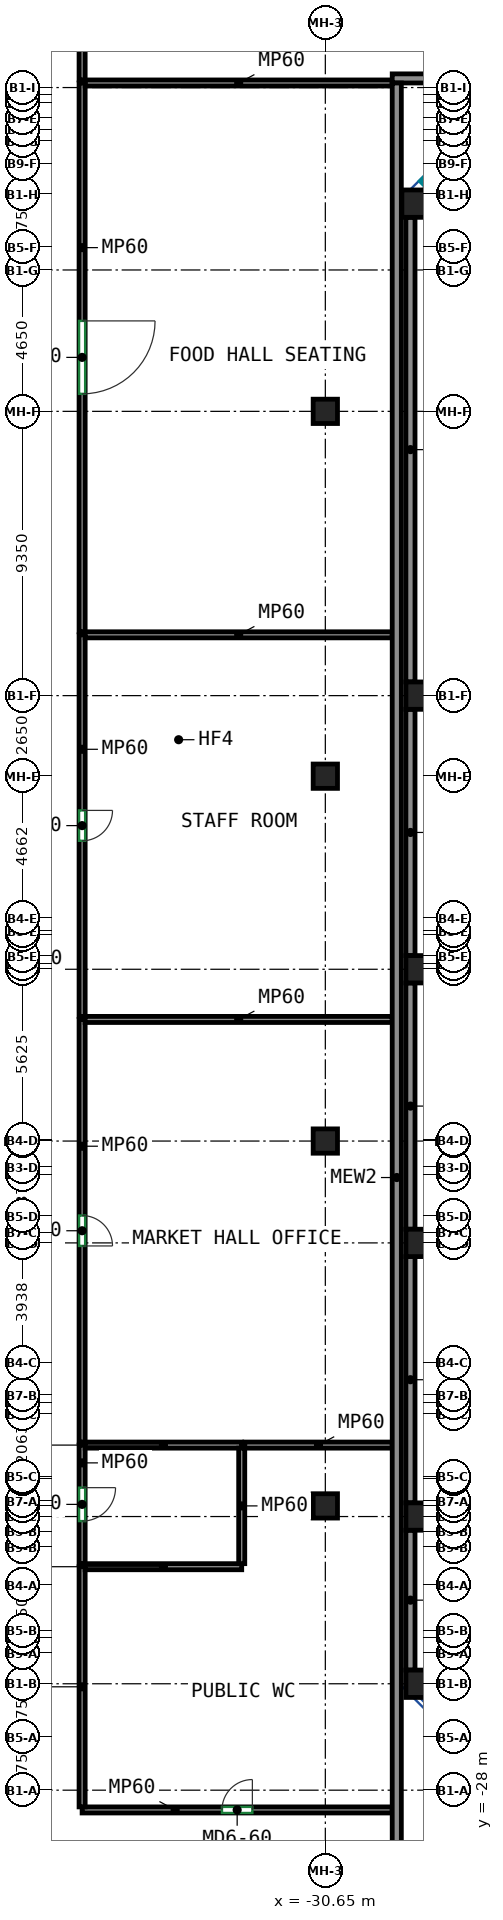
"""IFC4 building model, lengths in metres.
Left out: names, types, materials, properties, quantities, classifications, styles, units other than length and angle.
Written with IfcOpenShell. Run it as: python <this file> out.ifc"""

import sys

from ifc_helpers import new_model, si_unit, direction, frame, frame_2d, origin, origin_2d, place, context, subcontext, project, spatial, rectangle, extrude, source, transform, mapped, element, fill, save


model = new_model("IFC4")
c1 = context("Model", 3, precision=1e-05, world=origin(), true_north=direction((0.0, 1.0)))
c2 = subcontext(c1, "Body", "Model", "MODEL_VIEW")
j1 = project(units=[si_unit("LENGTHUNIT", "METRE"), si_unit("PLANEANGLEUNIT", "RADIAN")], contexts=[c1])
p1 = place(None, origin())
s1 = spatial("IfcSite", under=j1, at=p1, CompositionType="ELEMENT")
p2 = place(p1, origin())
s2 = spatial("IfcBuilding", under=s1, at=p2, CompositionType="ELEMENT")
p3 = place(p2, frame((0.0, 0.0, 9.0)))
s3 = spatial("IfcBuildingStorey", under=s2, at=p3, CompositionType="ELEMENT", Elevation=9.0)
m1 = source(origin(), c2, "Body", "SweptSolid", [
    extrude(rectangle(XDim=0.9, YDim=0.9, at=origin_2d()), origin(), (0.0, 0.0, 1.0), 4.1),
])
for number, where, z_axis, x_axis in (
    (1, (-27.682, 24.182, 0.0), (0.0, 0.0, 1.0), (1.0, 0.0, 0.0)),
    (2, (-27.55, -24.5, 0.0), (0.0, 0.0, 1.0), (1.0, 0.0, 0.0)),
    (3, (-27.55, -19.0, 0.0), (0.0, 0.0, 1.0), (1.0, 0.0, 0.0)),
    (4, (-27.55, -10.0, 0.0), (0.0, 0.0, 1.0), (1.0, 0.0, 0.0)),
    (5, (-27.55, -1.0, 0.0), (0.0, 0.0, 1.0), (1.0, 0.0, 0.0)),
    (6, (-27.55, 8.0, 0.0), (0.0, 0.0, 1.0), (1.0, 0.0, 0.0)),
):
    element("IfcColumn", number, at=place(p3, frame(where, z_axis=z_axis, x_axis=x_axis)), inside=s3, PredefinedType="COLUMN", context=c2, shape_type="MappedRepresentation", body=[
        mapped(m1, transform((0.0, 0.0, 0.0))),
    ])
m2 = source(origin(), c2, "Body", "SweptSolid", [
    extrude(rectangle(XDim=0.8, YDim=0.8, at=origin_2d()), origin(), (0.0, 0.0, 1.0), 4.1),
])
for number, where, z_axis, x_axis in (
    (7, (-30.65, -18.65, 0.0), (0.0, 0.0, 1.0), (1.0, 0.0, 0.0)),
    (8, (-30.65, -6.65, 0.0), (0.0, 0.0, 1.0), (1.0, 0.0, 0.0)),
    (9, (-30.65, 5.35, 0.0), (0.0, 0.0, 1.0), (1.0, 0.0, 0.0)),
    (10, (-30.65, 17.35, 0.0), (0.0, 0.0, 1.0), (1.0, 0.0, 0.0)),
):
    element("IfcColumn", number, at=place(p3, frame(where, z_axis=z_axis, x_axis=x_axis)), inside=s3, PredefinedType="COLUMN", context=c2, shape_type="MappedRepresentation", body=[
        mapped(m2, transform((0.0, 0.0, 0.0))),
    ])
m3 = source(origin(), c2, "Body", "SweptSolid", [
    extrude(rectangle(XDim=15.282, YDim=0.3, at=frame_2d((7.641, 0.0))), origin(), (0.0, 0.0, 1.0), 4.1),
])
p4 = place(p3, frame((-27.85, 23.732, 0.0), z_axis=(0.0, 0.0, 1.0), x_axis=(0.0, -1.0, 0.0)))
e11 = element("IfcWall", 11, at=p4, inside=s3, PredefinedType="SOLIDWALL", context=c2, shape_type="MappedRepresentation", body=[
    mapped(m3, transform((0.0, 0.0, 0.0))),
])
m4 = source(origin(), c2, "Body", "SweptSolid", [
    extrude(rectangle(XDim=8.1, YDim=0.3, at=frame_2d((4.05, 0.0))), origin(), (0.0, 0.0, 1.0), 4.1),
])
for number, where, z_axis, x_axis in (
    (12, (-27.85, 7.55, 0.0), (0.0, 0.0, 1.0), (0.0, -1.0, 0.0)),
    (13, (-27.85, -1.45, 0.0), (0.0, 0.0, 1.0), (0.0, -1.0, 0.0)),
    (14, (-27.85, -10.45, 0.0), (0.0, 0.0, 1.0), (0.0, -1.0, 0.0)),
):
    element("IfcWall", number, at=place(p3, frame(where, z_axis=z_axis, x_axis=x_axis)), inside=s3, PredefinedType="SOLIDWALL", context=c2, shape_type="MappedRepresentation", body=[
        mapped(m4, transform((0.0, 0.0, 0.0))),
    ])
m5 = source(origin(), c2, "Body", "SweptSolid", [
    extrude(rectangle(XDim=4.6, YDim=0.3, at=frame_2d((2.3, 0.0))), origin(), (0.0, 0.0, 1.0), 4.1),
])
p5 = place(p3, frame((-27.85, -19.45, 0.0), z_axis=(0.0, 0.0, 1.0), x_axis=(0.0, -1.0, 0.0)))
e15 = element("IfcWall", 15, at=p5, inside=s3, PredefinedType="SOLIDWALL", context=c2, shape_type="MappedRepresentation", body=[
    mapped(m5, transform((0.0, 0.0, 0.0))),
])
m6 = source(origin(), c2, "Body", "SweptSolid", [
    extrude(rectangle(XDim=84.0, YDim=0.3, at=frame_2d((42.0, 0.0))), origin(), (0.0, 0.0, 1.0), 4.1),
])
p6 = place(p3, frame((55.55, 28.3, 0.0), z_axis=(0.0, 0.0, 1.0), x_axis=(-1.0, 0.0, 0.0)))
e16 = element("IfcWall", 16, at=p6, inside=s3, PredefinedType="SOLIDWALL", context=c2, shape_type="MappedRepresentation", body=[
    mapped(m6, transform((0.0, 0.0, 0.0))),
])
m7 = source(origin(), c2, "Body", "SweptSolid", [
    extrude(rectangle(XDim=72.0, YDim=0.3, at=frame_2d((36.0, 0.0))), origin(), (0.0, 0.0, 1.0), 4.1),
])
p7 = place(p3, frame((-28.3, 28.15, 0.0), z_axis=(0.0, 0.0, 1.0), x_axis=(0.0, -1.0, 0.0)))
e17 = element("IfcWall", 17, at=p7, inside=s3, PredefinedType="SOLIDWALL", context=c2, shape_type="MappedRepresentation", body=[
    mapped(m7, transform((0.0, 0.0, 0.0))),
])
m8 = source(origin(), c2, "Body", "SweptSolid", [
    extrude(rectangle(XDim=10.2, YDim=0.2, at=frame_2d((5.1, 0.0))), origin(), (0.0, 0.0, 1.0), 3.2),
])
p8 = place(p3, frame((-38.65, -28.65, 0.0), z_axis=(0.0, 0.0, 1.0), x_axis=(1.0, 0.0, 0.0)))
e18 = element("IfcWall", 18, at=p8, inside=s3, PredefinedType="PARTITIONING", context=c2, shape_type="MappedRepresentation", body=[
    mapped(m8, transform((0.0, 0.0, 0.0))),
])
p9 = place(p8, frame((4.6, 0.0, 0.0)))
e19 = element("IfcOpeningElement", 19, at=p9, cuts=e18, PredefinedType="OPENING", context=c2, shape_type="SweptSolid", body=[
    extrude(rectangle(XDim=1.0, YDim=2.1, at=frame_2d((0.5, 1.05))), frame((0.0, 0.11, 0.0), z_axis=(0.0, -1.0, 0.0), x_axis=(1.0, 0.0, 0.0)), (0.0, 0.0, 1.0), 0.22),
])
m9 = source(origin(), c2, "Body", "SweptSolid", [
    extrude(rectangle(XDim=7.9, YDim=0.2, at=frame_2d((3.95, 0.0))), origin(), (0.0, 0.0, 1.0), 4.1),
])
p10 = place(p3, frame((-38.65, -20.65, 0.0), z_axis=(0.0, 0.0, 1.0), x_axis=(0.0, -1.0, 0.0)))
e20 = element("IfcWall", 20, at=p10, inside=s3, PredefinedType="PARTITIONING", context=c2, shape_type="MappedRepresentation", body=[
    mapped(m9, transform((0.0, 0.0, 0.0))),
])
m10 = source(origin(), c2, "Body", "SweptSolid", [
    extrude(rectangle(XDim=5.15, YDim=0.2, at=frame_2d((2.575, 0.0))), origin(), (0.0, 0.0, 1.0), 3.5),
])
p11 = place(p3, frame((-38.55, -20.65, 0.0), z_axis=(0.0, 0.0, 1.0), x_axis=(1.0, 0.0, 0.0)))
e21 = element("IfcWall", 21, at=p11, inside=s3, PredefinedType="PARTITIONING", context=c2, shape_type="MappedRepresentation", body=[
    mapped(m10, transform((0.0, 0.0, 0.0))),
])
m11 = source(origin(), c2, "Body", "SweptSolid", [
    extrude(rectangle(XDim=3.9, YDim=0.2, at=frame_2d((1.95, 0.0))), origin(), (0.0, 0.0, 1.0), 3.2),
])
p12 = place(p3, frame((-38.65, -16.65, 0.0), z_axis=(0.0, 0.0, 1.0), x_axis=(0.0, -1.0, 0.0)))
e22 = element("IfcWall", 22, at=p12, inside=s3, PredefinedType="PARTITIONING", context=c2, shape_type="MappedRepresentation", body=[
    mapped(m11, transform((0.0, 0.0, 0.0))),
])
p13 = place(p12, frame((1.4, 0.0, 0.0)))
e23 = element("IfcOpeningElement", 23, at=p13, cuts=e22, PredefinedType="OPENING", context=c2, shape_type="SweptSolid", body=[
    extrude(rectangle(XDim=1.1, YDim=2.1, at=frame_2d((0.55, 1.05))), frame((0.0, 0.11, 0.0), z_axis=(0.0, -1.0, 0.0), x_axis=(1.0, 0.0, 0.0)), (0.0, 0.0, 1.0), 0.22),
])
p14 = place(p3, frame((-38.55, -16.65, 0.0), z_axis=(0.0, 0.0, 1.0), x_axis=(1.0, 0.0, 0.0)))
e24 = element("IfcWall", 24, at=p14, inside=s3, PredefinedType="PARTITIONING", context=c2, shape_type="MappedRepresentation", body=[
    mapped(m10, transform((0.0, 0.0, 0.0))),
])
m12 = source(origin(), c2, "Body", "SweptSolid", [
    extrude(rectangle(XDim=13.9, YDim=0.2, at=frame_2d((6.95, 0.0))), origin(), (0.0, 0.0, 1.0), 3.2),
])
p15 = place(p3, frame((-38.65, -2.65, 0.0), z_axis=(0.0, 0.0, 1.0), x_axis=(0.0, -1.0, 0.0)))
e25 = element("IfcWall", 25, at=p15, inside=s3, PredefinedType="PARTITIONING", context=c2, shape_type="MappedRepresentation", body=[
    mapped(m12, transform((0.0, 0.0, 0.0))),
])
p16 = place(p15, frame((6.45, 0.0, 0.0)))
e26 = element("IfcOpeningElement", 26, at=p16, cuts=e25, PredefinedType="OPENING", context=c2, shape_type="SweptSolid", body=[
    extrude(rectangle(XDim=1.0, YDim=2.1, at=frame_2d((0.5, 1.05))), frame((0.0, 0.11, 0.0), z_axis=(0.0, -1.0, 0.0), x_axis=(1.0, 0.0, 0.0)), (0.0, 0.0, 1.0), 0.22),
])
m13 = source(origin(), c2, "Body", "SweptSolid", [
    extrude(rectangle(XDim=10.1, YDim=0.2, at=frame_2d((5.05, 0.0))), origin(), (0.0, 0.0, 1.0), 3.2),
])
p17 = place(p3, frame((-38.55, -2.65, 0.0), z_axis=(0.0, 0.0, 1.0), x_axis=(1.0, 0.0, 0.0)))
e27 = element("IfcWall", 27, at=p17, inside=s3, PredefinedType="PARTITIONING", context=c2, shape_type="MappedRepresentation", body=[
    mapped(m13, transform((0.0, 0.0, 0.0))),
])
m14 = source(origin(), c2, "Body", "SweptSolid", [
    extrude(rectangle(XDim=12.55, YDim=0.2, at=frame_2d((6.275, 0.0))), origin(), (0.0, 0.0, 1.0), 3.2),
])
p18 = place(p3, frame((-38.65, 10.0, 0.0), z_axis=(0.0, 0.0, 1.0), x_axis=(0.0, -1.0, 0.0)))
e28 = element("IfcWall", 28, at=p18, inside=s3, PredefinedType="PARTITIONING", context=c2, shape_type="MappedRepresentation", body=[
    mapped(m14, transform((0.0, 0.0, 0.0))),
])
p19 = place(p18, frame((5.775, 0.0, 0.0)))
e29 = element("IfcOpeningElement", 29, at=p19, cuts=e28, PredefinedType="OPENING", context=c2, shape_type="SweptSolid", body=[
    extrude(rectangle(XDim=1.0, YDim=2.1, at=frame_2d((0.5, 1.05))), frame((0.0, 0.11, 0.0), z_axis=(0.0, -1.0, 0.0), x_axis=(1.0, 0.0, 0.0)), (0.0, 0.0, 1.0), 0.22),
])
p20 = place(p3, frame((-38.55, 10.0, 0.0), z_axis=(0.0, 0.0, 1.0), x_axis=(1.0, 0.0, 0.0)))
e30 = element("IfcWall", 30, at=p20, inside=s3, PredefinedType="PARTITIONING", context=c2, shape_type="MappedRepresentation", body=[
    mapped(m13, transform((0.0, 0.0, 0.0))),
])
m15 = source(origin(), c2, "Body", "SweptSolid", [
    extrude(rectangle(XDim=18.05, YDim=0.2, at=frame_2d((9.025, 0.0))), origin(), (0.0, 0.0, 1.0), 3.2),
])
p21 = place(p3, frame((-38.65, 28.15, 0.0), z_axis=(0.0, 0.0, 1.0), x_axis=(0.0, -1.0, 0.0)))
e31 = element("IfcWall", 31, at=p21, inside=s3, PredefinedType="PARTITIONING", context=c2, shape_type="MappedRepresentation", body=[
    mapped(m15, transform((0.0, 0.0, 0.0))),
])
p22 = place(p21, frame((7.825, 0.0, 0.0)))
e32 = element("IfcOpeningElement", 32, at=p22, cuts=e31, PredefinedType="OPENING", context=c2, shape_type="SweptSolid", body=[
    extrude(rectangle(XDim=2.4, YDim=2.4, at=frame_2d((1.2, 1.2))), frame((0.0, 0.11, 0.0), z_axis=(0.0, -1.0, 0.0), x_axis=(1.0, 0.0, 0.0)), (0.0, 0.0, 1.0), 0.22),
])
p23 = place(p3, frame((-38.55, 28.15, 0.0), z_axis=(0.0, 0.0, 1.0), x_axis=(1.0, 0.0, 0.0)))
e33 = element("IfcWall", 33, at=p23, inside=s3, PredefinedType="PARTITIONING", context=c2, shape_type="MappedRepresentation", body=[
    mapped(m13, transform((0.0, 0.0, 0.0))),
])
m16 = source(origin(), c2, "Body", "SweptSolid", [
    extrude(rectangle(XDim=10.4, YDim=0.2, at=frame_2d((5.2, 0.0))), origin(), (0.0, 0.0, 1.0), 3.2),
])
p24 = place(p3, frame((-38.65, 38.65, 0.0), z_axis=(0.0, 0.0, 1.0), x_axis=(0.0, -1.0, 0.0)))
e34 = element("IfcWall", 34, at=p24, inside=s3, PredefinedType="PARTITIONING", context=c2, shape_type="MappedRepresentation", body=[
    mapped(m16, transform((0.0, 0.0, 0.0))),
])
m17 = source(origin(), c2, "Body", "SweptSolid", [
    extrude(rectangle(XDim=3.8, YDim=0.2, at=frame_2d((1.9, 0.0))), origin(), (0.0, 0.0, 1.0), 3.2),
])
p25 = place(p3, frame((-33.4, -20.55, 0.0), z_axis=(0.0, 0.0, 1.0), x_axis=(0.0, 1.0, 0.0)))
e35 = element("IfcWall", 35, at=p25, inside=s3, PredefinedType="PARTITIONING", context=c2, shape_type="MappedRepresentation", body=[
    mapped(m17, transform((0.0, 0.0, 0.0))),
])
m18 = source(origin(), c2, "Body", "SweptSolid", [
    extrude(rectangle(XDim=4.85, YDim=0.2, at=frame_2d((2.425, 0.0))), origin(), (0.0, 0.0, 1.0), 3.2),
])
p26 = place(p3, frame((-33.3, -16.65, 0.0), z_axis=(0.0, 0.0, 1.0), x_axis=(1.0, 0.0, 0.0)))
e36 = element("IfcWall", 36, at=p26, inside=s3, PredefinedType="PARTITIONING", context=c2, shape_type="MappedRepresentation", body=[
    mapped(m18, transform((0.0, 0.0, 0.0))),
])
p27 = place(p9, origin())
e37 = element("IfcDoor", 37, at=p27, inside=s3, OperationType="SINGLE_SWING_RIGHT", PredefinedType="DOOR", context=c2, shape_type="SweptSolid", body=[
    extrude(rectangle(XDim=1.0, YDim=2.1, at=frame_2d((0.5, 1.05))), frame((0.0, 0.025, 0.0), z_axis=(0.0, -1.0, 0.0), x_axis=(1.0, 0.0, 0.0)), (0.0, 0.0, 1.0), 0.05),
])
fill(e19, e37)
p28 = place(p13, origin())
e38 = element("IfcDoor", 38, at=p28, inside=s3, OperationType="SINGLE_SWING_LEFT", PredefinedType="DOOR", context=c2, shape_type="SweptSolid", body=[
    extrude(rectangle(XDim=1.1, YDim=2.1, at=frame_2d((0.55, 1.05))), frame((0.0, 0.025, 0.0), z_axis=(0.0, -1.0, 0.0), x_axis=(1.0, 0.0, 0.0)), (0.0, 0.0, 1.0), 0.05),
])
fill(e23, e38)
p29 = place(p16, origin())
e39 = element("IfcDoor", 39, at=p29, inside=s3, OperationType="SINGLE_SWING_RIGHT", PredefinedType="DOOR", context=c2, shape_type="SweptSolid", body=[
    extrude(rectangle(XDim=1.0, YDim=2.1, at=frame_2d((0.5, 1.05))), frame((0.0, 0.025, 0.0), z_axis=(0.0, -1.0, 0.0), x_axis=(1.0, 0.0, 0.0)), (0.0, 0.0, 1.0), 0.05),
])
fill(e26, e39)
p30 = place(p19, origin())
e40 = element("IfcDoor", 40, at=p30, inside=s3, OperationType="SINGLE_SWING_LEFT", PredefinedType="DOOR", context=c2, shape_type="SweptSolid", body=[
    extrude(rectangle(XDim=1.0, YDim=2.1, at=frame_2d((0.5, 1.05))), frame((0.0, 0.025, 0.0), z_axis=(0.0, -1.0, 0.0), x_axis=(1.0, 0.0, 0.0)), (0.0, 0.0, 1.0), 0.05),
])
fill(e29, e40)
p31 = place(p22, origin())
e41 = element("IfcDoor", 41, at=p31, inside=s3, OperationType="DOUBLE_DOOR_SINGLE_SWING", PredefinedType="DOOR", context=c2, shape_type="SweptSolid", body=[
    extrude(rectangle(XDim=2.4, YDim=2.4, at=frame_2d((1.2, 1.2))), frame((0.0, 0.025, 0.0), z_axis=(0.0, -1.0, 0.0), x_axis=(1.0, 0.0, 0.0)), (0.0, 0.0, 1.0), 0.05),
])
fill(e32, e41)
save(model, sys.argv[1])
